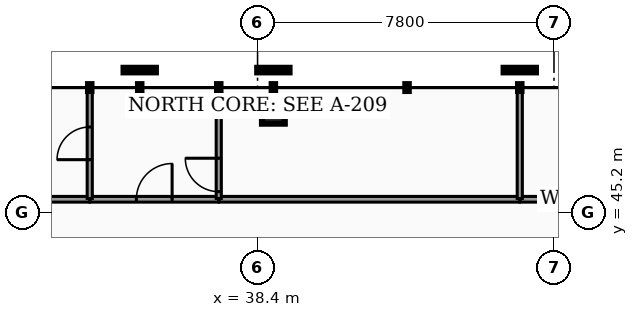
"""IFC4 building model, lengths in metres.
Left out: names, types, materials, properties, quantities, classifications, styles, units other than length and angle.
Written with IfcOpenShell. Run it as: python <this file> out.ifc"""

import sys

from ifc_helpers import new_model, si_unit, direction, frame, frame_2d, origin, origin_2d, place, context, subcontext, project, spatial, rectangle, hollow_rectangle, extrude, element, fill, save


model = new_model("IFC4")
c1 = context("Model", 3, precision=1e-05, world=origin(), true_north=direction((0.0, 1.0)))
c2 = subcontext(c1, "Body", "Model", "MODEL_VIEW")
j1 = project(units=[si_unit("LENGTHUNIT", "METRE"), si_unit("PLANEANGLEUNIT", "RADIAN")], contexts=[c1])
p1 = place(None, origin())
s1 = spatial("IfcSite", under=j1, at=p1, CompositionType="ELEMENT")
p2 = place(p1, origin())
s2 = spatial("IfcBuilding", under=s1, at=p2, CompositionType="ELEMENT")
p3 = place(p2, frame((0.0, 0.0, 204.34)))
s3 = spatial("IfcBuildingStorey", under=s2, at=p3, CompositionType="ELEMENT", Elevation=204.34)
p4 = place(p3, frame((38.816, 47.839, 0.0), z_axis=(-0.003370902678, -0.018598083742, 0.999821358192), x_axis=(0.983968158076, -0.178344228651, 0.0)))
e1 = element("IfcColumn", 1, at=p4, inside=s3, PredefinedType="COLUMN", context=c2, shape_type="SweptSolid", body=[
    extrude(hollow_rectangle(XDim=0.6, YDim=0.6, WallThickness=0.03, at=origin_2d()), origin(), (0.0, 0.0, 1.0), 4.201),
])
p5 = place(p3, frame((45.305, 45.55, 0.0), z_axis=(0.0, 0.0, 1.0), x_axis=(1.0, 0.0, 0.0)))
e2 = element("IfcWall", 2, at=p5, inside=s3, PredefinedType="PARTITIONING", context=c2, shape_type="SweptSolid", body=[
    extrude(rectangle(XDim=3.045, YDim=0.15, at=frame_2d((1.522, 0.0))), origin(), (0.0, 0.0, 1.0), 3.157),
])
p6 = place(p3, frame((33.989, 45.55, 0.0), z_axis=(0.0, 0.0, 1.0), x_axis=(1.0, 0.0, 0.0)))
e3 = element("IfcWall", 3, at=p6, inside=s3, PredefinedType="PARTITIONING", context=c2, shape_type="SweptSolid", body=[
    extrude(rectangle(XDim=3.385, YDim=0.15, at=frame_2d((1.692, 0.0))), origin(), (0.0, 0.0, 1.0), 3.157),
])
p7 = place(p6, frame((1.222, 0.0, 0.0)))
e4 = element("IfcOpeningElement", 4, at=p7, cuts=e3, PredefinedType="OPENING", context=c2, shape_type="SweptSolid", body=[
    extrude(rectangle(XDim=0.94, YDim=2.05, at=frame_2d((0.47, 1.025))), frame((0.0, 0.085, 0.0), z_axis=(0.0, -1.0, 0.0), x_axis=(1.0, 0.0, 0.0)), (0.0, 0.0, 1.0), 0.17),
])
p8 = place(p3, frame((37.384, 45.55, 0.0), z_axis=(0.0, 0.0, 1.0), x_axis=(1.0, 0.0, 0.0)))
e5 = element("IfcWall", 5, at=p8, inside=s3, PredefinedType="PARTITIONING", context=c2, shape_type="SweptSolid", body=[
    extrude(rectangle(XDim=7.911, YDim=0.15, at=frame_2d((3.956, 0.0))), origin(), (0.0, 0.0, 1.0), 3.157),
])
p9 = place(p3, frame((31.505, 45.55, 0.0), z_axis=(0.0, 0.0, 1.0), x_axis=(1.0, 0.0, 0.0)))
e6 = element("IfcWall", 6, at=p9, inside=s3, PredefinedType="PARTITIONING", context=c2, shape_type="SweptSolid", body=[
    extrude(rectangle(XDim=2.474, YDim=0.15, at=frame_2d((1.237, 0.0))), origin(), (0.0, 0.0, 1.0), 3.157),
])
p10 = place(p3, frame((45.3, 45.57, 0.0), z_axis=(0.0, 0.0, 1.0), x_axis=(0.0, 1.0, 0.0)))
e7 = element("IfcWall", 7, at=p10, inside=s3, PredefinedType="PARTITIONING", context=c2, shape_type="SweptSolid", body=[
    extrude(rectangle(XDim=2.904, YDim=0.135, at=frame_2d((1.452, 0.0))), origin(), (0.0, 0.0, 1.0), 3.157),
])
p11 = place(p3, frame((37.379, 45.57, 0.0), z_axis=(0.0, 0.0, 1.0), x_axis=(0.0, 1.0, 0.0)))
e8 = element("IfcWall", 8, at=p11, inside=s3, PredefinedType="PARTITIONING", context=c2, shape_type="SweptSolid", body=[
    extrude(rectangle(XDim=2.904, YDim=0.135, at=frame_2d((1.452, 0.0))), origin(), (0.0, 0.0, 1.0), 3.157),
])
p12 = place(p11, frame((0.18, 0.0, 0.0)))
e9 = element("IfcOpeningElement", 9, at=p12, cuts=e8, PredefinedType="OPENING", context=c2, shape_type="SweptSolid", body=[
    extrude(rectangle(XDim=0.88, YDim=2.05, at=frame_2d((0.44, 1.025))), frame((0.0, 0.077, 0.0), z_axis=(0.0, -1.0, 0.0), x_axis=(1.0, 0.0, 0.0)), (0.0, 0.0, 1.0), 0.155),
])
p13 = place(p3, frame((33.984, 45.57, 0.0), z_axis=(0.0, 0.0, 1.0), x_axis=(0.0, 1.0, 0.0)))
e10 = element("IfcWall", 10, at=p13, inside=s3, PredefinedType="PARTITIONING", context=c2, shape_type="SweptSolid", body=[
    extrude(rectangle(XDim=2.904, YDim=0.135, at=frame_2d((1.452, 0.0))), origin(), (0.0, 0.0, 1.0), 3.157),
])
p14 = place(p13, frame((1.022, 0.0, 0.0)))
e11 = element("IfcOpeningElement", 11, at=p14, cuts=e10, PredefinedType="OPENING", context=c2, shape_type="SweptSolid", body=[
    extrude(rectangle(XDim=0.86, YDim=2.05, at=frame_2d((0.43, 1.025))), frame((0.0, 0.077, 0.0), z_axis=(0.0, -1.0, 0.0), x_axis=(1.0, 0.0, 0.0)), (0.0, 0.0, 1.0), 0.155),
])
p15 = place(p7, origin())
e12 = element("IfcDoor", 12, at=p15, inside=s3, OperationType="SINGLE_SWING_RIGHT", PredefinedType="DOOR", context=c2, shape_type="SweptSolid", body=[
    extrude(rectangle(XDim=0.94, YDim=2.05, at=frame_2d((0.47, 1.025))), frame((0.0, 0.025, 0.0), z_axis=(0.0, -1.0, 0.0), x_axis=(1.0, 0.0, 0.0)), (0.0, 0.0, 1.0), 0.05),
])
fill(e4, e12)
p16 = place(p12, origin())
e13 = element("IfcDoor", 13, at=p16, inside=s3, OperationType="SINGLE_SWING_RIGHT", PredefinedType="DOOR", context=c2, shape_type="SweptSolid", body=[
    extrude(rectangle(XDim=0.88, YDim=2.05, at=frame_2d((0.44, 1.025))), frame((0.0, 0.025, 0.0), z_axis=(0.0, -1.0, 0.0), x_axis=(1.0, 0.0, 0.0)), (0.0, 0.0, 1.0), 0.05),
])
fill(e9, e13)
p17 = place(p14, origin())
e14 = element("IfcDoor", 14, at=p17, inside=s3, OperationType="SINGLE_SWING_LEFT", PredefinedType="DOOR", context=c2, shape_type="SweptSolid", body=[
    extrude(rectangle(XDim=0.86, YDim=2.05, at=frame_2d((0.43, 1.025))), frame((0.0, 0.025, 0.0), z_axis=(0.0, -1.0, 0.0), x_axis=(1.0, 0.0, 0.0)), (0.0, 0.0, 1.0), 0.05),
])
fill(e11, e14)
save(model, sys.argv[1])
